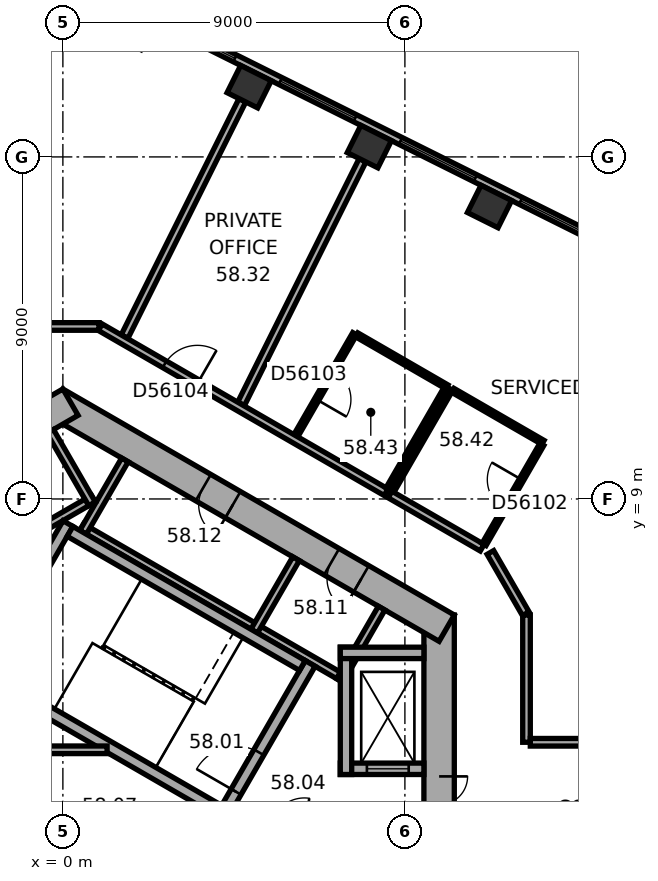
"""IFC4 building model, lengths in metres.
Left out: names, types, materials, properties, quantities, classifications, styles, units other than length and angle.
Written with IfcOpenShell. Run it as: python <this file> out.ifc"""

import sys

from ifc_helpers import new_model, si_unit, direction, frame, frame_2d, origin, origin_2d, place, context, subcontext, project, spatial, rectangle, extrude, element, fill, save


model = new_model("IFC4")
c1 = context("Model", 3, precision=1e-05, world=origin(), true_north=direction((0.0, 1.0)))
c2 = subcontext(c1, "Body", "Model", "MODEL_VIEW")
j1 = project(units=[si_unit("LENGTHUNIT", "METRE"), si_unit("PLANEANGLEUNIT", "RADIAN")], contexts=[c1])
p1 = place(None, origin())
s1 = spatial("IfcSite", under=j1, at=p1, CompositionType="ELEMENT")
p2 = place(p1, origin())
s2 = spatial("IfcBuilding", under=s1, at=p2, CompositionType="ELEMENT")
p3 = place(p2, frame((0.0, 0.0, 236.5)))
s3 = spatial("IfcBuildingStorey", under=s2, at=p3, CompositionType="ELEMENT", Elevation=236.5)
for number, where, z_axis, x_axis in (
    (1, (11.227, 16.695, 0.0), (0.0, 0.0, 1.0), (-0.895, 0.446, 0.0)),
    (2, (8.064, 18.271, 0.0), (0.0, 0.0, 1.0), (-0.895, 0.446, 0.0)),
    (3, (4.902, 19.848, 0.0), (0.0, 0.0, 1.0), (-0.895, 0.446, 0.0)),
):
    element("IfcColumn", number, at=place(p3, frame(where, z_axis=z_axis, x_axis=x_axis)), inside=s3, PredefinedType="COLUMN", context=c2, shape_type="SweptSolid", body=[
        extrude(rectangle(XDim=0.9, YDim=0.8, at=origin_2d()), origin(), (0.0, 0.0, 1.0), 3.7),
    ])
p4 = place(p3, frame((9.9, -5.947, 0.0), z_axis=(0.0, 0.0, 1.0), x_axis=(0.0, 1.0, 0.0)))
e4 = element("IfcWall", 4, at=p4, inside=s3, PredefinedType="SHEAR", context=c2, shape_type="SweptSolid", body=[
    extrude(rectangle(XDim=11.894, YDim=0.8, at=frame_2d((5.947, 0.0))), origin(), (0.0, 0.0, 1.0), 3.7),
])
p5 = place(p4, frame((6.147, 0.0, 0.0)))
e5 = element("IfcOpeningElement", 5, at=p5, cuts=e4, PredefinedType="OPENING", context=c2, shape_type="SweptSolid", body=[
    extrude(rectangle(XDim=1.5, YDim=2.1, at=frame_2d((0.75, 1.05))), frame((0.0, 0.41, 0.0), z_axis=(0.0, -1.0, 0.0), x_axis=(1.0, 0.0, 0.0)), (0.0, 0.0, 1.0), 0.82),
])
p6 = place(p4, frame((2.997, 0.0, 0.0)))
e6 = element("IfcOpeningElement", 6, at=p6, cuts=e4, PredefinedType="OPENING", context=c2, shape_type="SweptSolid", body=[
    extrude(rectangle(XDim=0.9, YDim=2.1, at=frame_2d((0.45, 1.05))), frame((0.0, 0.41, 0.0), z_axis=(0.0, -1.0, 0.0), x_axis=(1.0, 0.0, 0.0)), (0.0, 0.0, 1.0), 0.82),
])
p7 = place(p3, frame((10.1, 5.6, 0.0), z_axis=(0.0, 0.0, 1.0), x_axis=(-0.866023897231, 0.500002609418, 0.0)))
e7 = element("IfcWall", 7, at=p7, inside=s3, PredefinedType="SHEAR", context=c2, shape_type="SweptSolid", body=[
    extrude(rectangle(XDim=11.894, YDim=0.8, at=frame_2d((5.947, 0.0))), origin(), (0.0, 0.0, 1.0), 3.7),
])
p8 = place(p7, frame((2.597, 0.0, 0.0)))
e8 = element("IfcOpeningElement", 8, at=p8, cuts=e7, PredefinedType="OPENING", context=c2, shape_type="SweptSolid", body=[
    extrude(rectangle(XDim=0.9, YDim=2.1, at=frame_2d((0.45, 1.05))), frame((0.0, 0.41, 0.0), z_axis=(0.0, -1.0, 0.0), x_axis=(1.0, 0.0, 0.0)), (0.0, 0.0, 1.0), 0.82),
])
p9 = place(p7, frame((6.497, 0.0, 0.0)))
e9 = element("IfcOpeningElement", 9, at=p9, cuts=e7, PredefinedType="OPENING", context=c2, shape_type="SweptSolid", body=[
    extrude(rectangle(XDim=0.9, YDim=2.1, at=frame_2d((0.45, 1.05))), frame((0.0, 0.41, 0.0), z_axis=(0.0, -1.0, 0.0), x_axis=(1.0, 0.0, 0.0)), (0.0, 0.0, 1.0), 0.82),
])
p10 = place(p3, frame((0.2, 11.547, 0.0), z_axis=(0.0, 0.0, 1.0), x_axis=(-0.866023897231, -0.500002609418, 0.0)))
e10 = element("IfcWall", 10, at=p10, inside=s3, PredefinedType="SHEAR", context=c2, shape_type="SweptSolid", body=[
    extrude(rectangle(XDim=11.894, YDim=0.8, at=frame_2d((5.947, 0.0))), origin(), (0.0, 0.0, 1.0), 3.7),
])
p11 = place(p10, frame((6.147, 0.0, 0.0)))
e11 = element("IfcOpeningElement", 11, at=p11, cuts=e10, PredefinedType="OPENING", context=c2, shape_type="SweptSolid", body=[
    extrude(rectangle(XDim=1.5, YDim=2.1, at=frame_2d((0.75, 1.05))), frame((0.0, 0.41, 0.0), z_axis=(0.0, -1.0, 0.0), x_axis=(1.0, 0.0, 0.0)), (0.0, 0.0, 1.0), 0.82),
])
p12 = place(p10, frame((2.997, 0.0, 0.0)))
e12 = element("IfcOpeningElement", 12, at=p12, cuts=e10, PredefinedType="OPENING", context=c2, shape_type="SweptSolid", body=[
    extrude(rectangle(XDim=0.9, YDim=2.1, at=frame_2d((0.45, 1.05))), frame((0.0, 0.41, 0.0), z_axis=(0.0, -1.0, 0.0), x_axis=(1.0, 0.0, 0.0)), (0.0, 0.0, 1.0), 0.82),
])
p13 = place(p3, frame((18.299, 13.727, 0.0), z_axis=(0.0, 0.0, 1.0), x_axis=(-0.894934554817, 0.44619742558, 0.0)))
e13 = element("IfcWall", 13, at=p13, inside=s3, PredefinedType="STANDARD", context=c2, shape_type="SweptSolid", body=[
    extrude(rectangle(XDim=18.841, YDim=0.2, at=frame_2d((9.421, 0.0))), origin(), (0.0, 0.0, 1.0), 3.7),
])
p14 = place(p13, frame((1.253, 0.0, 0.9)))
e14 = element("IfcOpeningElement", 14, at=p14, cuts=e13, PredefinedType="OPENING", context=c2, shape_type="SweptSolid", body=[
    extrude(rectangle(XDim=2.2, YDim=2.0, at=frame_2d((1.1, 1.0))), frame((0.0, 0.11, 0.0), z_axis=(0.0, -1.0, 0.0), x_axis=(1.0, 0.0, 0.0)), (0.0, 0.0, 1.0), 0.22),
])
p15 = place(p13, frame((4.786, 0.0, 0.9)))
e15 = element("IfcOpeningElement", 15, at=p15, cuts=e13, PredefinedType="OPENING", context=c2, shape_type="SweptSolid", body=[
    extrude(rectangle(XDim=2.2, YDim=2.0, at=frame_2d((1.1, 1.0))), frame((0.0, 0.11, 0.0), z_axis=(0.0, -1.0, 0.0), x_axis=(1.0, 0.0, 0.0)), (0.0, 0.0, 1.0), 0.22),
])
p16 = place(p13, frame((8.32, 0.0, 0.9)))
e16 = element("IfcOpeningElement", 16, at=p16, cuts=e13, PredefinedType="OPENING", context=c2, shape_type="SweptSolid", body=[
    extrude(rectangle(XDim=2.2, YDim=2.0, at=frame_2d((1.1, 1.0))), frame((0.0, 0.11, 0.0), z_axis=(0.0, -1.0, 0.0), x_axis=(1.0, 0.0, 0.0)), (0.0, 0.0, 1.0), 0.22),
])
p17 = place(p13, frame((11.854, 0.0, 0.9)))
e17 = element("IfcOpeningElement", 17, at=p17, cuts=e13, PredefinedType="OPENING", context=c2, shape_type="SweptSolid", body=[
    extrude(rectangle(XDim=2.2, YDim=2.0, at=frame_2d((1.1, 1.0))), frame((0.0, 0.11, 0.0), z_axis=(0.0, -1.0, 0.0), x_axis=(1.0, 0.0, 0.0)), (0.0, 0.0, 1.0), 0.22),
])
p18 = place(p13, frame((15.387, 0.0, 0.9)))
e18 = element("IfcOpeningElement", 18, at=p18, cuts=e13, PredefinedType="OPENING", context=c2, shape_type="SweptSolid", body=[
    extrude(rectangle(XDim=2.2, YDim=2.0, at=frame_2d((1.1, 1.0))), frame((0.0, 0.11, 0.0), z_axis=(0.0, -1.0, 0.0), x_axis=(1.0, 0.0, 0.0)), (0.0, 0.0, 1.0), 0.22),
])
p19 = place(p3, frame((7.424, 4.259, 0.0), z_axis=(0.0, 0.0, 1.0), x_axis=(-0.866026010844, 0.49999894854, 0.0)))
e19 = element("IfcWall", 19, at=p19, inside=s3, PredefinedType="PARTITIONING", context=c2, shape_type="SweptSolid", body=[
    extrude(rectangle(XDim=8.0, YDim=0.2, at=frame_2d((4.0, 0.0))), origin(), (0.0, 0.0, 1.0), 3.42),
])
for number, where, z_axis, x_axis in (
    (20, (7.287, 4.222, 0.0), (0.0, 0.0, 1.0), (0.5, 0.866, 0.0)),
    (21, (5.036, 5.522, 0.0), (0.0, 0.0, 1.0), (0.5, 0.866, 0.0)),
    (22, (0.532, 8.122, 0.0), (0.0, 0.0, 1.0), (0.5, 0.866, 0.0)),
):
    element("IfcWall", number, at=place(p3, frame(where, z_axis=z_axis, x_axis=x_axis)), inside=s3, PredefinedType="PARTITIONING", context=c2, shape_type="SweptSolid", body=[
        extrude(rectangle(XDim=2.2, YDim=0.2, at=frame_2d((1.1, 0.0))), origin(), (0.0, 0.0, 1.0), 3.42),
    ])
p20 = place(p3, frame((0.803, 9.009, 0.0), z_axis=(0.0, 0.0, 1.0), x_axis=(-0.866028230842, -0.499995103361, 0.0)))
e23 = element("IfcWall", 23, at=p20, inside=s3, PredefinedType="PARTITIONING", context=c2, shape_type="SweptSolid", body=[
    extrude(rectangle(XDim=5.4, YDim=0.2, at=frame_2d((2.7, 0.0))), origin(), (0.0, 0.0, 1.0), 3.42),
])
p21 = place(p3, frame((0.767, 8.872, 0.0), z_axis=(0.0, 0.0, 1.0), x_axis=(-0.499994660107, 0.866028486751, 0.0)))
e24 = element("IfcWall", 24, at=p21, inside=s3, PredefinedType="PARTITIONING", context=c2, shape_type="SweptSolid", body=[
    extrude(rectangle(XDim=2.2, YDim=0.2, at=frame_2d((1.1, 0.0))), origin(), (0.0, 0.0, 1.0), 3.42),
])
p22 = place(p3, frame((4.158, 0.602, 0.0), z_axis=(0.0, 0.0, 1.0), x_axis=(0.499977259774, 0.866038532462, 0.0)))
e25 = element("IfcWall", 25, at=p22, inside=s3, PredefinedType="SHEAR", context=c2, shape_type="SweptSolid", body=[
    extrude(rectangle(XDim=4.7, YDim=0.3, at=frame_2d((2.35, 0.0))), origin(), (0.0, 0.0, 1.0), 3.42),
])
p23 = place(p22, frame((0.8, 0.0, 0.0)))
e26 = element("IfcOpeningElement", 26, at=p23, cuts=e25, PredefinedType="OPENING", context=c2, shape_type="SweptSolid", body=[
    extrude(rectangle(XDim=1.2, YDim=2.1, at=frame_2d((0.6, 1.05))), frame((0.0, 0.16, 0.0), z_axis=(0.0, -1.0, 0.0), x_axis=(1.0, 0.0, 0.0)), (0.0, 0.0, 1.0), 0.32),
])
p24 = place(p3, frame((-2.216, 4.282, 0.0), z_axis=(0.0, 0.0, 1.0), x_axis=(0.499977259774, 0.866038532462, 0.0)))
e27 = element("IfcWall", 27, at=p24, inside=s3, PredefinedType="SHEAR", context=c2, shape_type="SweptSolid", body=[
    extrude(rectangle(XDim=4.7, YDim=0.3, at=frame_2d((2.35, 0.0))), origin(), (0.0, 0.0, 1.0), 3.42),
])
for number, where, z_axis, x_axis in (
    (28, (4.103, 0.807, 0.0), (0.0, 0.0, 1.0), (-0.866, 0.5, 0.0)),
    (29, (6.303, 4.617, 0.0), (0.0, 0.0, 1.0), (-0.866, 0.5, 0.0)),
):
    element("IfcWall", number, at=place(p3, frame(where, z_axis=z_axis, x_axis=x_axis)), inside=s3, PredefinedType="SHEAR", context=c2, shape_type="SweptSolid", body=[
        extrude(rectangle(XDim=7.06, YDim=0.3, at=frame_2d((3.53, 0.0))), origin(), (0.0, 0.0, 1.0), 3.42),
    ])
p25 = place(p3, frame((7.3, 1.9, 0.0), z_axis=(0.0, 0.0, 1.0), x_axis=(1.0, 0.0, 0.0)))
e30 = element("IfcWall", 30, at=p25, inside=s3, PredefinedType="SHEAR", context=c2, shape_type="SweptSolid", body=[
    extrude(rectangle(XDim=2.2, YDim=0.3, at=frame_2d((1.1, 0.0))), origin(), (0.0, 0.0, 1.0), 3.42),
])
p26 = place(p25, frame((0.7, 0.0, 0.0)))
e31 = element("IfcOpeningElement", 31, at=p26, cuts=e30, PredefinedType="OPENING", context=c2, shape_type="SweptSolid", body=[
    extrude(rectangle(XDim=1.1, YDim=2.1, at=frame_2d((0.55, 1.05))), frame((0.0, 0.16, 0.0), z_axis=(0.0, -1.0, 0.0), x_axis=(1.0, 0.0, 0.0)), (0.0, 0.0, 1.0), 0.32),
])
p27 = place(p3, frame((7.45, 1.75, 0.0), z_axis=(0.0, 0.0, 1.0), x_axis=(0.0, 1.0, 0.0)))
e32 = element("IfcWall", 32, at=p27, inside=s3, PredefinedType="SHEAR", context=c2, shape_type="SweptSolid", body=[
    extrude(rectangle(XDim=3.35, YDim=0.3, at=frame_2d((1.675, 0.0))), origin(), (0.0, 0.0, 1.0), 3.42),
])
p28 = place(p3, frame((7.3, 4.95, 0.0), z_axis=(0.0, 0.0, 1.0), x_axis=(1.0, 0.0, 0.0)))
e33 = element("IfcWall", 33, at=p28, inside=s3, PredefinedType="SHEAR", context=c2, shape_type="SweptSolid", body=[
    extrude(rectangle(XDim=2.2, YDim=0.3, at=frame_2d((1.1, 0.0))), origin(), (0.0, 0.0, 1.0), 3.42),
])
p29 = place(p3, frame((-2.72, 2.4, 0.0), z_axis=(0.0, 0.0, 1.0), x_axis=(1.0, 0.0, 0.0)))
e34 = element("IfcWall", 34, at=p29, inside=s3, PredefinedType="PARTITIONING", context=c2, shape_type="SweptSolid", body=[
    extrude(rectangle(XDim=3.883, YDim=0.2, at=frame_2d((1.941, 0.0))), origin(), (0.0, 0.0, 1.0), 3.42),
])
p30 = place(p3, frame((0.95, 13.539, 0.0), z_axis=(0.0, 0.0, 1.0), x_axis=(-1.0, 0.0, 0.0)))
e35 = element("IfcWall", 35, at=p30, inside=s3, PredefinedType="PARTITIONING", context=c2, shape_type="SweptSolid", body=[
    extrude(rectangle(XDim=1.9, YDim=0.2, at=frame_2d((0.95, 0.0))), origin(), (0.0, 0.0, 1.0), 3.42),
])
p31 = place(p3, frame((4.723, 19.49, 0.0), z_axis=(0.0, 0.0, 1.0), x_axis=(-0.446186614574, -0.894939944898, 0.0)))
e36 = element("IfcWall", 36, at=p31, inside=s3, PredefinedType="PARTITIONING", context=c2, shape_type="SweptSolid", body=[
    extrude(rectangle(XDim=6.944, YDim=0.2, at=frame_2d((3.472, 0.0))), origin(), (0.0, 0.0, 1.0), 2.87),
])
p32 = place(p3, frame((6.13, 10.664, 0.0), z_axis=(0.0, 0.0, 1.0), x_axis=(0.499967891604, 0.866043940782, 0.0)))
e37 = element("IfcWall", 37, at=p32, inside=s3, PredefinedType="PARTITIONING", context=c2, shape_type="SweptSolid", body=[
    extrude(rectangle(XDim=3.1, YDim=0.12, at=frame_2d((1.55, 0.0))), origin(), (0.0, 0.0, 1.0), 3.42),
])
p33 = place(p32, frame((1.1, 0.0, 0.0)))
e38 = element("IfcOpeningElement", 38, at=p33, cuts=e37, PredefinedType="OPENING", context=c2, shape_type="SweptSolid", body=[
    extrude(rectangle(XDim=0.9, YDim=2.1, at=frame_2d((0.45, 1.05))), frame((0.0, 0.07, 0.0), z_axis=(0.0, -1.0, 0.0), x_axis=(1.0, 0.0, 0.0)), (0.0, 0.0, 1.0), 0.14),
])
p34 = place(p3, frame((7.732, 13.318, 0.0), z_axis=(0.0, 0.0, 1.0), x_axis=(0.866057988685, -0.499943557049, 0.0)))
e39 = element("IfcWall", 39, at=p34, inside=s3, PredefinedType="PARTITIONING", context=c2, shape_type="SweptSolid", body=[
    extrude(rectangle(XDim=2.74, YDim=0.12, at=frame_2d((1.37, 0.0))), origin(), (0.0, 0.0, 1.0), 3.42),
])
p35 = place(p3, frame((7.886, 17.913, 0.0), z_axis=(0.0, 0.0, 1.0), x_axis=(-0.446204015428, -0.894931269213, 0.0)))
e40 = element("IfcWall", 40, at=p35, inside=s3, PredefinedType="PARTITIONING", context=c2, shape_type="SweptSolid", body=[
    extrude(rectangle(XDim=7.16, YDim=0.2, at=frame_2d((3.58, 0.0))), origin(), (0.0, 0.0, 1.0), 3.42),
])
p36 = place(p3, frame((8.505, 9.177, 0.0), z_axis=(0.0, 0.0, 1.0), x_axis=(-0.866019839902, 0.500009636803, 0.0)))
e41 = element("IfcWall", 41, at=p36, inside=s3, PredefinedType="PARTITIONING", context=c2, shape_type="SweptSolid", body=[
    extrude(rectangle(XDim=8.683, YDim=0.2, at=frame_2d((4.342, 0.0))), origin(), (0.0, 0.0, 1.0), 3.42),
])
p37 = place(p36, frame((5.73, 0.0, 0.0)))
e42 = element("IfcOpeningElement", 42, at=p37, cuts=e41, PredefinedType="OPENING", context=c2, shape_type="SweptSolid", body=[
    extrude(rectangle(XDim=1.0, YDim=2.1, at=frame_2d((0.5, 1.05))), frame((0.0, 0.11, 0.0), z_axis=(0.0, -1.0, 0.0), x_axis=(1.0, 0.0, 0.0)), (0.0, 0.0, 1.0), 0.22),
])
p38 = place(p3, frame((8.659, 9.204, 0.0), z_axis=(0.0, 0.0, 1.0), x_axis=(0.499933790963, 0.866063626216, 0.0)))
e43 = element("IfcWall", 43, at=p38, inside=s3, PredefinedType="PARTITIONING", context=c2, shape_type="SweptSolid", body=[
    extrude(rectangle(XDim=3.1, YDim=0.12, at=frame_2d((1.55, 0.0))), origin(), (0.0, 0.0, 1.0), 3.42),
])
p39 = place(p3, frame((10.075, 11.896, 0.0), z_axis=(0.0, 0.0, 1.0), x_axis=(-0.499991248344, -0.866030456496, 0.0)))
e44 = element("IfcWall", 44, at=p39, inside=s3, PredefinedType="PARTITIONING", context=c2, shape_type="SweptSolid", body=[
    extrude(rectangle(XDim=3.04, YDim=0.12, at=frame_2d((1.52, 0.0))), origin(), (0.0, 0.0, 1.0), 3.42),
])
p40 = place(p3, frame((10.26, 11.858, 0.0), z_axis=(0.0, 0.0, 1.0), x_axis=(0.866019409031, -0.500010383074, 0.0)))
e45 = element("IfcWall", 45, at=p40, inside=s3, PredefinedType="PARTITIONING", context=c2, shape_type="SweptSolid", body=[
    extrude(rectangle(XDim=2.74, YDim=0.12, at=frame_2d((1.37, 0.0))), origin(), (0.0, 0.0, 1.0), 3.42),
])
p41 = place(p3, frame((11.033, 7.717, 0.0), z_axis=(0.0, 0.0, 1.0), x_axis=(-0.865996816683, 0.500049511043, 0.0)))
e46 = element("IfcWall", 46, at=p41, inside=s3, PredefinedType="PARTITIONING", context=c2, shape_type="SweptSolid", body=[
    extrude(rectangle(XDim=2.8, YDim=0.2, at=frame_2d((1.4, 0.0))), origin(), (0.0, 0.0, 1.0), 3.42),
])
p42 = place(p3, frame((12.18, 5.981, 0.0), z_axis=(0.0, 0.0, 1.0), x_axis=(-0.499964847546, 0.866045698112, 0.0)))
e47 = element("IfcWall", 47, at=p42, inside=s3, PredefinedType="PARTITIONING", context=c2, shape_type="SweptSolid", body=[
    extrude(rectangle(XDim=1.86, YDim=0.2, at=frame_2d((0.93, 0.0))), origin(), (0.0, 0.0, 1.0), 3.42),
])
p43 = place(p3, frame((12.2, 2.598, 0.0), z_axis=(0.0, 0.0, 1.0), x_axis=(0.0, 1.0, 0.0)))
e48 = element("IfcWall", 48, at=p43, inside=s3, PredefinedType="PARTITIONING", context=c2, shape_type="SweptSolid", body=[
    extrude(rectangle(XDim=3.349, YDim=0.2, at=frame_2d((1.674, 0.0))), origin(), (0.0, 0.0, 1.0), 3.42),
])
p44 = place(p3, frame((12.604, 10.436, 0.0), z_axis=(0.0, 0.0, 1.0), x_axis=(-0.500026023896, -0.86601037836, 0.0)))
e49 = element("IfcWall", 49, at=p44, inside=s3, PredefinedType="PARTITIONING", context=c2, shape_type="SweptSolid", body=[
    extrude(rectangle(XDim=3.04, YDim=0.12, at=frame_2d((1.52, 0.0))), origin(), (0.0, 0.0, 1.0), 3.42),
])
p45 = place(p44, frame((1.07, 0.0, 0.0)))
e50 = element("IfcOpeningElement", 50, at=p45, cuts=e49, PredefinedType="OPENING", context=c2, shape_type="SweptSolid", body=[
    extrude(rectangle(XDim=0.9, YDim=2.1, at=frame_2d((0.45, 1.05))), frame((0.0, 0.07, 0.0), z_axis=(0.0, -1.0, 0.0), x_axis=(1.0, 0.0, 0.0)), (0.0, 0.0, 1.0), 0.14),
])
p46 = place(p3, frame((19.55, 2.598, 0.0), z_axis=(0.0, 0.0, 1.0), x_axis=(-1.0, 0.0, 0.0)))
e51 = element("IfcWall", 51, at=p46, inside=s3, PredefinedType="PARTITIONING", context=c2, shape_type="SweptSolid", body=[
    extrude(rectangle(XDim=7.25, YDim=0.2, at=frame_2d((3.625, 0.0))), origin(), (0.0, 0.0, 1.0), 3.42),
])
p47 = place(p46, frame((3.125, 0.0, 0.0)))
e52 = element("IfcOpeningElement", 52, at=p47, cuts=e51, PredefinedType="OPENING", context=c2, shape_type="SweptSolid", body=[
    extrude(rectangle(XDim=1.0, YDim=2.1, at=frame_2d((0.5, 1.05))), frame((0.0, 0.11, 0.0), z_axis=(0.0, -1.0, 0.0), x_axis=(1.0, 0.0, 0.0)), (0.0, 0.0, 1.0), 0.22),
])
p48 = place(p15, origin())
e53 = element("IfcWindow", 53, at=p48, inside=s3, PartitioningType="SINGLE_PANEL", PredefinedType="WINDOW", context=c2, shape_type="SweptSolid", body=[
    extrude(rectangle(XDim=2.2, YDim=2.0, at=frame_2d((1.1, 1.0))), frame((0.0, 0.03, 0.0), z_axis=(0.0, -1.0, 0.0), x_axis=(1.0, 0.0, 0.0)), (0.0, 0.0, 1.0), 0.06),
])
fill(e15, e53)
p49 = place(p16, origin())
e54 = element("IfcWindow", 54, at=p49, inside=s3, PartitioningType="SINGLE_PANEL", PredefinedType="WINDOW", context=c2, shape_type="SweptSolid", body=[
    extrude(rectangle(XDim=2.2, YDim=2.0, at=frame_2d((1.1, 1.0))), frame((0.0, 0.03, 0.0), z_axis=(0.0, -1.0, 0.0), x_axis=(1.0, 0.0, 0.0)), (0.0, 0.0, 1.0), 0.06),
])
fill(e16, e54)
p50 = place(p17, origin())
e55 = element("IfcWindow", 55, at=p50, inside=s3, PartitioningType="SINGLE_PANEL", PredefinedType="WINDOW", context=c2, shape_type="SweptSolid", body=[
    extrude(rectangle(XDim=2.2, YDim=2.0, at=frame_2d((1.1, 1.0))), frame((0.0, 0.03, 0.0), z_axis=(0.0, -1.0, 0.0), x_axis=(1.0, 0.0, 0.0)), (0.0, 0.0, 1.0), 0.06),
])
fill(e17, e55)
p51 = place(p18, origin())
e56 = element("IfcWindow", 56, at=p51, inside=s3, PartitioningType="SINGLE_PANEL", PredefinedType="WINDOW", context=c2, shape_type="SweptSolid", body=[
    extrude(rectangle(XDim=2.2, YDim=2.0, at=frame_2d((1.1, 1.0))), frame((0.0, 0.03, 0.0), z_axis=(0.0, -1.0, 0.0), x_axis=(1.0, 0.0, 0.0)), (0.0, 0.0, 1.0), 0.06),
])
fill(e18, e56)
p52 = place(p5, origin())
e57 = element("IfcDoor", 57, at=p52, inside=s3, OperationType="DOUBLE_DOOR_SINGLE_SWING", PredefinedType="DOOR", context=c2, shape_type="SweptSolid", body=[
    extrude(rectangle(XDim=1.5, YDim=2.1, at=frame_2d((0.75, 1.05))), frame((0.0, 0.025, 0.0), z_axis=(0.0, -1.0, 0.0), x_axis=(1.0, 0.0, 0.0)), (0.0, 0.0, 1.0), 0.05),
])
fill(e5, e57)
p53 = place(p23, origin())
e58 = element("IfcDoor", 58, at=p53, inside=s3, OperationType="SINGLE_SWING_RIGHT", PredefinedType="DOOR", context=c2, shape_type="SweptSolid", body=[
    extrude(rectangle(XDim=1.2, YDim=2.1, at=frame_2d((0.6, 1.05))), frame((0.0, 0.025, 0.0), z_axis=(0.0, -1.0, 0.0), x_axis=(1.0, 0.0, 0.0)), (0.0, 0.0, 1.0), 0.05),
])
fill(e26, e58)
p54 = place(p8, origin())
e59 = element("IfcDoor", 59, at=p54, inside=s3, OperationType="SINGLE_SWING_LEFT", PredefinedType="DOOR", context=c2, shape_type="SweptSolid", body=[
    extrude(rectangle(XDim=0.9, YDim=2.1, at=frame_2d((0.45, 1.05))), frame((0.0, 0.025, 0.0), z_axis=(0.0, -1.0, 0.0), x_axis=(1.0, 0.0, 0.0)), (0.0, 0.0, 1.0), 0.05),
])
fill(e8, e59)
p55 = place(p9, origin())
e60 = element("IfcDoor", 60, at=p55, inside=s3, OperationType="SINGLE_SWING_LEFT", PredefinedType="DOOR", context=c2, shape_type="SweptSolid", body=[
    extrude(rectangle(XDim=0.9, YDim=2.1, at=frame_2d((0.45, 1.05))), frame((0.0, 0.025, 0.0), z_axis=(0.0, -1.0, 0.0), x_axis=(1.0, 0.0, 0.0)), (0.0, 0.0, 1.0), 0.05),
])
fill(e9, e60)
p56 = place(p26, origin())
e61 = element("IfcDoor", 61, at=p56, inside=s3, OperationType="DOUBLE_DOOR_SLIDING", PredefinedType="DOOR", context=c2, shape_type="SweptSolid", body=[
    extrude(rectangle(XDim=1.1, YDim=2.1, at=frame_2d((0.55, 1.05))), frame((0.0, 0.025, 0.0), z_axis=(0.0, -1.0, 0.0), x_axis=(1.0, 0.0, 0.0)), (0.0, 0.0, 1.0), 0.05),
])
fill(e31, e61)
p57 = place(p45, origin())
e62 = element("IfcDoor", 62, at=p57, inside=s3, OperationType="SINGLE_SWING_LEFT", PredefinedType="DOOR", context=c2, shape_type="SweptSolid", body=[
    extrude(rectangle(XDim=0.9, YDim=2.1, at=frame_2d((0.45, 1.05))), frame((0.0, 0.025, 0.0), z_axis=(0.0, -1.0, 0.0), x_axis=(1.0, 0.0, 0.0)), (0.0, 0.0, 1.0), 0.05),
])
fill(e50, e62)
p58 = place(p33, origin())
e63 = element("IfcDoor", 63, at=p58, inside=s3, OperationType="SINGLE_SWING_LEFT", PredefinedType="DOOR", context=c2, shape_type="SweptSolid", body=[
    extrude(rectangle(XDim=0.9, YDim=2.1, at=frame_2d((0.45, 1.05))), frame((0.0, 0.025, 0.0), z_axis=(0.0, -1.0, 0.0), x_axis=(1.0, 0.0, 0.0)), (0.0, 0.0, 1.0), 0.05),
])
fill(e38, e63)
p59 = place(p37, origin())
e64 = element("IfcDoor", 64, at=p59, inside=s3, OperationType="SINGLE_SWING_LEFT", PredefinedType="DOOR", context=c2, shape_type="SweptSolid", body=[
    extrude(rectangle(XDim=1.0, YDim=2.1, at=frame_2d((0.5, 1.05))), frame((0.0, 0.025, 0.0), z_axis=(0.0, -1.0, 0.0), x_axis=(1.0, 0.0, 0.0)), (0.0, 0.0, 1.0), 0.05),
])
fill(e42, e64)
save(model, sys.argv[1])
